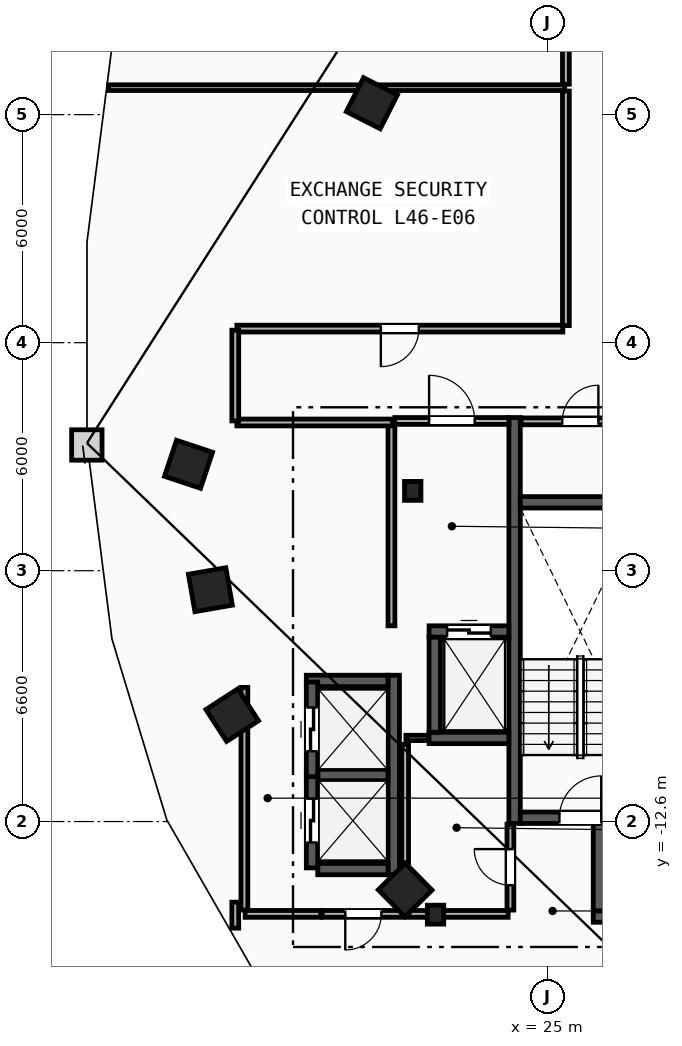
"""IFC4 building model, lengths in metres.
Left out: names, types, materials, properties, quantities, classifications, styles, units other than length and angle.
Written with IfcOpenShell. Run it as: python <this file> out.ifc"""

import sys

from ifc_helpers import new_model, si_unit, direction, frame, frame_2d, origin, origin_2d, place, context, subcontext, project, spatial, rectangle, i_section, extrude, element, fill, save


model = new_model("IFC4")
c1 = context("Model", 3, precision=1e-05, world=origin(), true_north=direction((0.0, 1.0)))
c2 = subcontext(c1, "Body", "Model", "MODEL_VIEW")
j1 = project(units=[si_unit("LENGTHUNIT", "METRE"), si_unit("PLANEANGLEUNIT", "RADIAN")], contexts=[c1])
p1 = place(None, origin())
s1 = spatial("IfcSite", under=j1, at=p1, CompositionType="ELEMENT")
p2 = place(p1, origin())
s2 = spatial("IfcBuilding", under=s1, at=p2, CompositionType="ELEMENT")
p3 = place(p2, frame((0.0, 0.0, 176.4)))
s3 = spatial("IfcBuildingStorey", under=s2, at=p3, CompositionType="ELEMENT", Elevation=176.4)
for number, where, z_axis, x_axis in (
    (1, (21.45, -3.9, 0.0), (0.0, 0.0, 1.0), (1.0, 0.0, 0.0)),
    (2, (22.05, -15.05, 0.0), (0.0, 0.0, 1.0), (1.0, 0.0, 0.0)),
):
    element("IfcColumn", number, at=place(p3, frame(where, z_axis=z_axis, x_axis=x_axis)), inside=s3, PredefinedType="COLUMN", context=c2, shape_type="SweptSolid", body=[
        extrude(i_section(OverallWidth=0.432, OverallDepth=0.498, WebThickness=0.056, FlangeThickness=0.089, FilletRadius=0.018, at=origin_2d()), origin(), (0.0, 0.0, 1.0), 3.6),
    ])
for number, where, z_axis, x_axis in (
    (3, (15.55, -3.2, 0.0), (0.0, 0.0, 1.0), (-0.315, -0.949, 0.0)),
    (4, (16.125, -6.5, 0.0), (0.0, 0.0, 1.0), (0.172, -0.985, 0.0)),
    (5, (16.7, -9.8, 0.0), (0.0, 0.0, 1.0), (0.544, -0.839, 0.0)),
    (6, (21.25, -14.4, 0.0), (0.0, 0.0, 1.0), (0.703, -0.711, 0.0)),
    (7, (20.375, 6.3, 0.0), (0.0, 0.0, 1.0), (-0.453, -0.892, 0.0)),
):
    element("IfcColumn", number, at=place(p3, frame(where, z_axis=z_axis, x_axis=x_axis)), inside=s3, PredefinedType="COLUMN", context=c2, shape_type="SweptSolid", body=[
        extrude(rectangle(XDim=1.0, YDim=1.0, at=origin_2d()), origin(), (0.0, 0.0, 1.0), 3.6),
    ])
p4 = place(p3, frame((24.13, -12.65, 0.0), z_axis=(0.0, 0.0, 1.0), x_axis=(0.0, 1.0, 0.0)))
e8 = element("IfcWall", 8, at=p4, inside=s3, PredefinedType="SHEAR", context=c2, shape_type="SweptSolid", body=[
    extrude(rectangle(XDim=10.68, YDim=0.3, at=frame_2d((5.34, 0.0))), origin(), (0.0, 0.0, 1.0), 3.36),
])
p5 = place(p3, frame((24.28, -12.5, 0.0), z_axis=(0.0, 0.0, 1.0), x_axis=(1.0, 0.0, 0.0)))
e9 = element("IfcWall", 9, at=p5, inside=s3, PredefinedType="SHEAR", context=c2, shape_type="SweptSolid", body=[
    extrude(rectangle(XDim=3.16, YDim=0.3, at=frame_2d((1.58, 0.0))), origin(), (0.0, 0.0, 1.0), 3.36),
])
p6 = place(p5, frame((1.03, 0.0, 0.0)))
e10 = element("IfcOpeningElement", 10, at=p6, cuts=e9, PredefinedType="OPENING", context=c2, shape_type="SweptSolid", body=[
    extrude(rectangle(XDim=1.1, YDim=2.15, at=frame_2d((0.55, 1.075))), frame((0.0, 0.16, 0.0), z_axis=(0.0, -1.0, 0.0), x_axis=(1.0, 0.0, 0.0)), (0.0, 0.0, 1.0), 0.32),
])
p7 = place(p3, frame((24.28, -4.2, 0.0), z_axis=(0.0, 0.0, 1.0), x_axis=(1.0, 0.0, 0.0)))
e11 = element("IfcWall", 11, at=p7, inside=s3, PredefinedType="SHEAR", context=c2, shape_type="SweptSolid", body=[
    extrude(rectangle(XDim=3.16, YDim=0.3, at=frame_2d((1.58, 0.0))), origin(), (0.0, 0.0, 1.0), 3.36),
])
p8 = place(p3, frame((20.89, -7.45, 0.0), z_axis=(0.0, 0.0, 1.0), x_axis=(0.0, 1.0, 0.0)))
e12 = element("IfcWall", 12, at=p8, inside=s3, PredefinedType="PARTITIONING", context=c2, shape_type="SweptSolid", body=[
    extrude(rectangle(XDim=5.3, YDim=0.18, at=frame_2d((2.65, 0.0))), origin(), (0.0, 0.0, 1.0), 3.36),
])
p9 = place(p3, frame((20.98, -2.06, 0.0), z_axis=(0.0, 0.0, 1.0), x_axis=(1.0, 0.0, 0.0)))
e13 = element("IfcWall", 13, at=p9, inside=s3, PredefinedType="PARTITIONING", context=c2, shape_type="SweptSolid", body=[
    extrude(rectangle(XDim=3.0, YDim=0.18, at=frame_2d((1.5, 0.0))), origin(), (0.0, 0.0, 1.0), 3.36),
])
p10 = place(p9, frame((0.9, 0.0, 0.0)))
e14 = element("IfcOpeningElement", 14, at=p10, cuts=e13, PredefinedType="OPENING", context=c2, shape_type="SweptSolid", body=[
    extrude(rectangle(XDim=1.2, YDim=2.15, at=frame_2d((0.6, 1.075))), frame((0.0, 0.1, 0.0), z_axis=(0.0, -1.0, 0.0), x_axis=(1.0, 0.0, 0.0)), (0.0, 0.0, 1.0), 0.2),
])
p11 = place(p3, frame((21.88, -7.6, 0.0), z_axis=(0.0, 0.0, 1.0), x_axis=(1.0, 0.0, 0.0)))
e15 = element("IfcWall", 15, at=p11, inside=s3, PredefinedType="SHEAR", context=c2, shape_type="SweptSolid", body=[
    extrude(rectangle(XDim=2.1, YDim=0.3, at=frame_2d((1.05, 0.0))), origin(), (0.0, 0.0, 1.0), 3.36),
])
p12 = place(p11, frame((0.475, 0.0, 0.0)))
e16 = element("IfcOpeningElement", 16, at=p12, cuts=e15, PredefinedType="OPENING", context=c2, shape_type="SweptSolid", body=[
    extrude(rectangle(XDim=1.15, YDim=2.2, at=frame_2d((0.575, 1.1))), frame((0.0, 0.16, 0.0), z_axis=(0.0, -1.0, 0.0), x_axis=(1.0, 0.0, 0.0)), (0.0, 0.0, 1.0), 0.32),
])
p13 = place(p3, frame((21.88, -10.4, 0.0), z_axis=(0.0, 0.0, 1.0), x_axis=(1.0, 0.0, 0.0)))
e17 = element("IfcWall", 17, at=p13, inside=s3, PredefinedType="SHEAR", context=c2, shape_type="SweptSolid", body=[
    extrude(rectangle(XDim=2.1, YDim=0.3, at=frame_2d((1.05, 0.0))), origin(), (0.0, 0.0, 1.0), 3.36),
])
for number, where, z_axis, x_axis in (
    (18, (22.03, -10.25, 0.0), (0.0, 0.0, 1.0), (0.0, 1.0, 0.0)),
    (19, (26.2, -15.1, 0.0), (0.0, 0.0, 1.0), (1.0, 0.0, 0.0)),
):
    element("IfcWall", number, at=place(p3, frame(where, z_axis=z_axis, x_axis=x_axis)), inside=s3, PredefinedType="SHEAR", context=c2, shape_type="SweptSolid", body=[
        extrude(rectangle(XDim=2.5, YDim=0.3, at=frame_2d((1.25, 0.0))), origin(), (0.0, 0.0, 1.0), 3.36),
    ])
p14 = place(p3, frame((26.35, -14.95, 0.0), z_axis=(0.0, 0.0, 1.0), x_axis=(0.0, 1.0, 0.0)))
e20 = element("IfcWall", 20, at=p14, inside=s3, PredefinedType="SHEAR", context=c2, shape_type="SweptSolid", body=[
    extrude(rectangle(XDim=2.3, YDim=0.3, at=frame_2d((1.15, 0.0))), origin(), (0.0, 0.0, 1.0), 3.36),
])
p15 = place(p3, frame((20.95, -14.0, 0.0), z_axis=(0.0, 0.0, 1.0), x_axis=(0.0, 1.0, 0.0)))
e21 = element("IfcWall", 21, at=p15, inside=s3, PredefinedType="SHEAR", context=c2, shape_type="SweptSolid", body=[
    extrude(rectangle(XDim=5.25, YDim=0.3, at=frame_2d((2.625, 0.0))), origin(), (0.0, 0.0, 1.0), 3.36),
])
p16 = place(p3, frame((18.95, -13.85, 0.0), z_axis=(0.0, 0.0, 1.0), x_axis=(1.0, 0.0, 0.0)))
e22 = element("IfcWall", 22, at=p16, inside=s3, PredefinedType="SHEAR", context=c2, shape_type="SweptSolid", body=[
    extrude(rectangle(XDim=1.85, YDim=0.3, at=frame_2d((0.925, 0.0))), origin(), (0.0, 0.0, 1.0), 3.36),
])
p17 = place(p3, frame((18.65, -8.9, 0.0), z_axis=(0.0, 0.0, 1.0), x_axis=(1.0, 0.0, 0.0)))
e23 = element("IfcWall", 23, at=p17, inside=s3, PredefinedType="SHEAR", context=c2, shape_type="SweptSolid", body=[
    extrude(rectangle(XDim=2.15, YDim=0.3, at=frame_2d((1.075, 0.0))), origin(), (0.0, 0.0, 1.0), 3.36),
])
p18 = place(p3, frame((18.95, -11.375, 0.0), z_axis=(0.0, 0.0, 1.0), x_axis=(1.0, 0.0, 0.0)))
e24 = element("IfcWall", 24, at=p18, inside=s3, PredefinedType="SHEAR", context=c2, shape_type="SweptSolid", body=[
    extrude(rectangle(XDim=1.85, YDim=0.3, at=frame_2d((0.925, 0.0))), origin(), (0.0, 0.0, 1.0), 3.36),
])
p19 = place(p3, frame((18.8, -13.82, 0.0), z_axis=(0.0, 0.0, 1.0), x_axis=(0.0, 1.0, 0.0)))
e25 = element("IfcWall", 25, at=p19, inside=s3, PredefinedType="SHEAR", context=c2, shape_type="SweptSolid", body=[
    extrude(rectangle(XDim=2.49, YDim=0.3, at=frame_2d((1.245, 0.0))), origin(), (0.0, 0.0, 1.0), 3.36),
])
p20 = place(p19, frame((0.67, 0.0, 0.0)))
e26 = element("IfcOpeningElement", 26, at=p20, cuts=e25, PredefinedType="OPENING", context=c2, shape_type="SweptSolid", body=[
    extrude(rectangle(XDim=1.15, YDim=2.2, at=frame_2d((0.575, 1.1))), frame((0.0, 0.16, 0.0), z_axis=(0.0, -1.0, 0.0), x_axis=(1.0, 0.0, 0.0)), (0.0, 0.0, 1.0), 0.32),
])
p21 = place(p3, frame((18.8, -11.42, 0.0), z_axis=(0.0, 0.0, 1.0), x_axis=(0.0, 1.0, 0.0)))
e27 = element("IfcWall", 27, at=p21, inside=s3, PredefinedType="SHEAR", context=c2, shape_type="SweptSolid", body=[
    extrude(rectangle(XDim=2.49, YDim=0.3, at=frame_2d((1.245, 0.0))), origin(), (0.0, 0.0, 1.0), 3.36),
])
p22 = place(p21, frame((0.67, 0.0, 0.0)))
e28 = element("IfcOpeningElement", 28, at=p22, cuts=e27, PredefinedType="OPENING", context=c2, shape_type="SweptSolid", body=[
    extrude(rectangle(XDim=1.15, YDim=2.2, at=frame_2d((0.575, 1.1))), frame((0.0, 0.16, 0.0), z_axis=(0.0, -1.0, 0.0), x_axis=(1.0, 0.0, 0.0)), (0.0, 0.0, 1.0), 0.32),
])
p23 = place(p3, frame((17.02, -14.93, 0.0), z_axis=(0.0, 0.0, 1.0), x_axis=(0.0, 1.0, 0.0)))
e29 = element("IfcWall", 29, at=p23, inside=s3, PredefinedType="PARTITIONING", context=c2, shape_type="SweptSolid", body=[
    extrude(rectangle(XDim=5.86, YDim=0.18, at=frame_2d((2.93, 0.0))), origin(), (0.0, 0.0, 1.0), 3.36),
])
p24 = place(p3, frame((17.04, -15.03, 0.0), z_axis=(0.0, 0.0, 1.0), x_axis=(1.0, 0.0, 0.0)))
e30 = element("IfcWall", 30, at=p24, inside=s3, PredefinedType="PARTITIONING", context=c2, shape_type="SweptSolid", body=[
    extrude(rectangle(XDim=1.99, YDim=0.18, at=frame_2d((0.995, 0.0))), origin(), (0.0, 0.0, 1.0), 3.36),
])
p25 = place(p3, frame((21.23, -15.03, 0.0), z_axis=(0.0, 0.0, 1.0), x_axis=(-1.0, 0.0, 0.0)))
e31 = element("IfcWall", 31, at=p25, inside=s3, PredefinedType="PARTITIONING", context=c2, shape_type="SweptSolid", body=[
    extrude(rectangle(XDim=2.16, YDim=0.18, at=frame_2d((1.08, 0.0))), origin(), (0.0, 0.0, 1.0), 3.36),
])
p26 = place(p25, frame((0.605, 0.0, 0.0)))
e32 = element("IfcOpeningElement", 32, at=p26, cuts=e31, PredefinedType="OPENING", context=c2, shape_type="SweptSolid", body=[
    extrude(rectangle(XDim=0.95, YDim=2.1, at=frame_2d((0.475, 1.05))), frame((0.0, 0.1, 0.0), z_axis=(0.0, -1.0, 0.0), x_axis=(1.0, 0.0, 0.0)), (0.0, 0.0, 1.0), 0.2),
])
p27 = place(p3, frame((21.27, -10.4, 0.0), z_axis=(0.0, 0.0, 1.0), x_axis=(1.0, 0.0, 0.0)))
e33 = element("IfcWall", 33, at=p27, inside=s3, PredefinedType="PARTITIONING", context=c2, shape_type="SweptSolid", body=[
    extrude(rectangle(XDim=0.59, YDim=0.14, at=frame_2d((0.295, 0.0))), origin(), (0.0, 0.0, 1.0), 3.36),
])
p28 = place(p3, frame((21.25, -14.93, 0.0), z_axis=(0.0, 0.0, 1.0), x_axis=(0.0, 1.0, 0.0)))
e34 = element("IfcWall", 34, at=p28, inside=s3, PredefinedType="PARTITIONING", context=c2, shape_type="SweptSolid", body=[
    extrude(rectangle(XDim=4.36, YDim=0.18, at=frame_2d((2.18, 0.0))), origin(), (0.0, 0.0, 1.0), 3.36),
])
p29 = place(p3, frame((21.35, -15.03, 0.0), z_axis=(0.0, 0.0, 1.0), x_axis=(1.0, 0.0, 0.0)))
e35 = element("IfcWall", 35, at=p29, inside=s3, PredefinedType="PARTITIONING", context=c2, shape_type="SweptSolid", body=[
    extrude(rectangle(XDim=2.61, YDim=0.18, at=frame_2d((1.305, 0.0))), origin(), (0.0, 0.0, 1.0), 2.433),
])
p30 = place(p3, frame((24.3, -2.07, 0.0), z_axis=(0.0, 0.0, 1.0), x_axis=(1.0, 0.0, 0.0)))
e36 = element("IfcWall", 36, at=p30, inside=s3, PredefinedType="PARTITIONING", context=c2, shape_type="SweptSolid", body=[
    extrude(rectangle(XDim=3.12, YDim=0.18, at=frame_2d((1.56, 0.0))), origin(), (0.0, 0.0, 1.0), 3.36),
])
p31 = place(p30, frame((1.085, 0.0, 0.0)))
e37 = element("IfcOpeningElement", 37, at=p31, cuts=e36, PredefinedType="OPENING", context=c2, shape_type="SweptSolid", body=[
    extrude(rectangle(XDim=0.95, YDim=2.1, at=frame_2d((0.475, 1.05))), frame((0.0, 0.1, 0.0), z_axis=(0.0, -1.0, 0.0), x_axis=(1.0, 0.0, 0.0)), (0.0, 0.0, 1.0), 0.2),
])
p32 = place(p3, frame((24.02, -14.93, 0.0), z_axis=(0.0, 0.0, 1.0), x_axis=(0.0, 1.0, 0.0)))
e38 = element("IfcWall", 38, at=p32, inside=s3, PredefinedType="PARTITIONING", context=c2, shape_type="SweptSolid", body=[
    extrude(rectangle(XDim=2.26, YDim=0.18, at=frame_2d((1.13, 0.0))), origin(), (0.0, 0.0, 1.0), 3.36),
])
p33 = place(p32, frame((0.655, 0.0, 0.0)))
e39 = element("IfcOpeningElement", 39, at=p33, cuts=e38, PredefinedType="OPENING", context=c2, shape_type="SweptSolid", body=[
    extrude(rectangle(XDim=0.95, YDim=2.1, at=frame_2d((0.475, 1.05))), frame((0.0, 0.1, 0.0), z_axis=(0.0, -1.0, 0.0), x_axis=(1.0, 0.0, 0.0)), (0.0, 0.0, 1.0), 0.2),
])
p34 = place(p3, frame((13.447, 6.71, 0.0), z_axis=(0.0, 0.0, 1.0), x_axis=(1.0, 0.0, 0.0)))
e40 = element("IfcWall", 40, at=p34, inside=s3, PredefinedType="PARTITIONING", context=c2, shape_type="SweptSolid", body=[
    extrude(rectangle(XDim=12.003, YDim=0.15, at=frame_2d((6.001, 0.0))), origin(), (0.0, 0.0, 1.0), 3.36),
])
p35 = place(p3, frame((25.4, 0.37, 0.0), z_axis=(0.0, 0.0, 1.0), x_axis=(-1.0, 0.0, 0.0)))
e41 = element("IfcWall", 41, at=p35, inside=s3, PredefinedType="PARTITIONING", context=c2, shape_type="SweptSolid", body=[
    extrude(rectangle(XDim=8.578, YDim=0.18, at=frame_2d((4.289, 0.0))), origin(), (0.0, 0.0, 1.0), 3.36),
])
p36 = place(p35, frame((3.789, 0.0, 0.0)))
e42 = element("IfcOpeningElement", 42, at=p36, cuts=e41, PredefinedType="OPENING", context=c2, shape_type="SweptSolid", body=[
    extrude(rectangle(XDim=1.0, YDim=2.15, at=frame_2d((0.5, 1.075))), frame((0.0, 0.1, 0.0), z_axis=(0.0, -1.0, 0.0), x_axis=(1.0, 0.0, 0.0)), (0.0, 0.0, 1.0), 0.2),
])
p37 = place(p3, frame((25.48, 6.62, 0.0), z_axis=(0.0, 0.0, 1.0), x_axis=(0.0, -1.0, 0.0)))
e43 = element("IfcWall", 43, at=p37, inside=s3, PredefinedType="PARTITIONING", context=c2, shape_type="SweptSolid", body=[
    extrude(rectangle(XDim=6.17, YDim=0.18, at=frame_2d((3.085, 0.0))), origin(), (0.0, 0.0, 1.0), 3.36),
])
p38 = place(p3, frame((16.822, -2.1, 0.0), z_axis=(0.0, 0.0, 1.0), x_axis=(1.0, 0.0, 0.0)))
e44 = element("IfcWall", 44, at=p38, inside=s3, PredefinedType="PARTITIONING", context=c2, shape_type="SweptSolid", body=[
    extrude(rectangle(XDim=4.098, YDim=0.18, at=frame_2d((2.049, 0.0))), origin(), (0.0, 0.0, 1.0), 3.36),
])
p39 = place(p3, frame((16.78, 0.329, 0.0), z_axis=(0.0, 0.0, 1.0), x_axis=(0.0, -1.0, 0.0)))
e45 = element("IfcWall", 45, at=p39, inside=s3, PredefinedType="PARTITIONING", context=c2, shape_type="SweptSolid", body=[
    extrude(rectangle(XDim=2.387, YDim=0.18, at=frame_2d((1.194, 0.0))), origin(), (0.0, 0.0, 1.0), 3.36),
])
p40 = place(p3, frame((16.78, -14.721, 0.0), z_axis=(0.0, 0.0, 1.0), x_axis=(0.0, -1.0, 0.0)))
e46 = element("IfcWall", 46, at=p40, inside=s3, PredefinedType="PARTITIONING", context=c2, shape_type="SweptSolid", body=[
    extrude(rectangle(XDim=0.684, YDim=0.18, at=frame_2d((0.342, 0.0))), origin(), (0.0, 0.0, 1.0), 3.36),
])
p41 = place(p3, frame((25.48, 11.178, 0.0), z_axis=(0.0, 0.0, 1.0), x_axis=(0.0, -1.0, 0.0)))
e47 = element("IfcWall", 47, at=p41, inside=s3, PredefinedType="PARTITIONING", context=c2, shape_type="SweptSolid", body=[
    extrude(rectangle(XDim=4.378, YDim=0.18, at=frame_2d((2.189, 0.0))), origin(), (0.0, 0.0, 1.0), 3.36),
])
p42 = place(p41, frame((1.689, 0.0, 0.0)))
e48 = element("IfcOpeningElement", 48, at=p42, cuts=e47, PredefinedType="OPENING", context=c2, shape_type="SweptSolid", body=[
    extrude(rectangle(XDim=1.0, YDim=2.15, at=frame_2d((0.5, 1.075))), frame((0.0, 0.1, 0.0), z_axis=(0.0, -1.0, 0.0), x_axis=(1.0, 0.0, 0.0)), (0.0, 0.0, 1.0), 0.2),
])
p43 = place(p6, origin())
e49 = element("IfcDoor", 49, at=p43, inside=s3, OperationType="SINGLE_SWING_RIGHT", PredefinedType="DOOR", context=c2, shape_type="SweptSolid", body=[
    extrude(rectangle(XDim=1.1, YDim=2.15, at=frame_2d((0.55, 1.075))), frame((0.0, 0.025, 0.0), z_axis=(0.0, -1.0, 0.0), x_axis=(1.0, 0.0, 0.0)), (0.0, 0.0, 1.0), 0.05),
])
fill(e10, e49)
p44 = place(p10, origin())
e50 = element("IfcDoor", 50, at=p44, inside=s3, OperationType="SINGLE_SWING_LEFT", PredefinedType="DOOR", context=c2, shape_type="SweptSolid", body=[
    extrude(rectangle(XDim=1.2, YDim=2.15, at=frame_2d((0.6, 1.075))), frame((0.0, 0.025, 0.0), z_axis=(0.0, -1.0, 0.0), x_axis=(1.0, 0.0, 0.0)), (0.0, 0.0, 1.0), 0.05),
])
fill(e14, e50)
p45 = place(p12, origin())
e51 = element("IfcDoor", 51, at=p45, inside=s3, OperationType="SLIDING_TO_LEFT", PredefinedType="TRAPDOOR", context=c2, shape_type="SweptSolid", body=[
    extrude(rectangle(XDim=1.15, YDim=2.2, at=frame_2d((0.575, 1.1))), frame((0.0, 0.025, 0.0), z_axis=(0.0, -1.0, 0.0), x_axis=(1.0, 0.0, 0.0)), (0.0, 0.0, 1.0), 0.05),
])
fill(e16, e51)
p46 = place(p20, origin())
e52 = element("IfcDoor", 52, at=p46, inside=s3, OperationType="SLIDING_TO_LEFT", PredefinedType="TRAPDOOR", context=c2, shape_type="SweptSolid", body=[
    extrude(rectangle(XDim=1.15, YDim=2.2, at=frame_2d((0.575, 1.1))), frame((0.0, 0.025, 0.0), z_axis=(0.0, -1.0, 0.0), x_axis=(1.0, 0.0, 0.0)), (0.0, 0.0, 1.0), 0.05),
])
fill(e26, e52)
p47 = place(p22, origin())
e53 = element("IfcDoor", 53, at=p47, inside=s3, OperationType="SLIDING_TO_LEFT", PredefinedType="TRAPDOOR", context=c2, shape_type="SweptSolid", body=[
    extrude(rectangle(XDim=1.15, YDim=2.2, at=frame_2d((0.575, 1.1))), frame((0.0, 0.025, 0.0), z_axis=(0.0, -1.0, 0.0), x_axis=(1.0, 0.0, 0.0)), (0.0, 0.0, 1.0), 0.05),
])
fill(e28, e53)
p48 = place(p36, origin())
e54 = element("IfcDoor", 54, at=p48, inside=s3, OperationType="SINGLE_SWING_RIGHT", PredefinedType="DOOR", context=c2, shape_type="SweptSolid", body=[
    extrude(rectangle(XDim=1.0, YDim=2.15, at=frame_2d((0.5, 1.075))), frame((0.0, 0.025, 0.0), z_axis=(0.0, -1.0, 0.0), x_axis=(1.0, 0.0, 0.0)), (0.0, 0.0, 1.0), 0.05),
])
fill(e42, e54)
p49 = place(p31, origin())
e55 = element("IfcDoor", 55, at=p49, inside=s3, OperationType="SINGLE_SWING_RIGHT", PredefinedType="DOOR", context=c2, shape_type="SweptSolid", body=[
    extrude(rectangle(XDim=0.95, YDim=2.1, at=frame_2d((0.475, 1.05))), frame((0.0, 0.025, 0.0), z_axis=(0.0, -1.0, 0.0), x_axis=(1.0, 0.0, 0.0)), (0.0, 0.0, 1.0), 0.05),
])
fill(e37, e55)
p50 = place(p33, origin())
e56 = element("IfcDoor", 56, at=p50, inside=s3, OperationType="SINGLE_SWING_RIGHT", PredefinedType="DOOR", context=c2, shape_type="SweptSolid", body=[
    extrude(rectangle(XDim=0.95, YDim=2.1, at=frame_2d((0.475, 1.05))), frame((0.0, 0.025, 0.0), z_axis=(0.0, -1.0, 0.0), x_axis=(1.0, 0.0, 0.0)), (0.0, 0.0, 1.0), 0.05),
])
fill(e39, e56)
p51 = place(p26, origin())
e57 = element("IfcDoor", 57, at=p51, inside=s3, OperationType="SINGLE_SWING_RIGHT", PredefinedType="DOOR", context=c2, shape_type="SweptSolid", body=[
    extrude(rectangle(XDim=0.95, YDim=2.1, at=frame_2d((0.475, 1.05))), frame((0.0, 0.025, 0.0), z_axis=(0.0, -1.0, 0.0), x_axis=(1.0, 0.0, 0.0)), (0.0, 0.0, 1.0), 0.05),
])
fill(e32, e57)
save(model, sys.argv[1])
